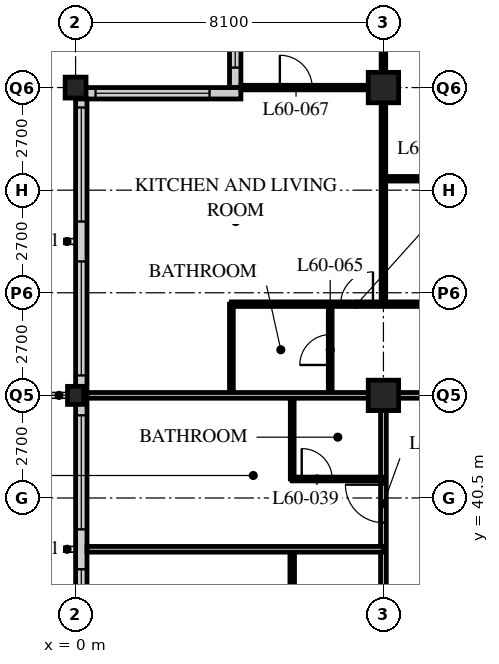
"""IFC4 building model, lengths in metres.
Left out: names, types, materials, properties, quantities, classifications, styles, units other than length and angle.
Written with IfcOpenShell. Run it as: python <this file> out.ifc"""

import sys

from ifc_helpers import new_model, si_unit, direction, frame, frame_2d, origin, origin_2d, place, context, subcontext, project, spatial, rectangle, hollow_rectangle, i_section, extrude, element, fill, save


model = new_model("IFC4")
c1 = context("Model", 3, precision=1e-05, world=origin(), true_north=direction((0.0, 1.0)))
c2 = subcontext(c1, "Body", "Model", "MODEL_VIEW")
j1 = project(units=[si_unit("LENGTHUNIT", "METRE"), si_unit("PLANEANGLEUNIT", "RADIAN")], contexts=[c1])
p1 = place(None, origin())
s1 = spatial("IfcSite", under=j1, at=p1, CompositionType="ELEMENT")
p2 = place(p1, origin())
s2 = spatial("IfcBuilding", under=s1, at=p2, CompositionType="ELEMENT")
p3 = place(p2, frame((0.0, 0.0, 231.6)))
s3 = spatial("IfcBuildingStorey", under=s2, at=p3, CompositionType="ELEMENT", Elevation=231.6)
p4 = place(p3, frame((0.0, 43.2, 0.0), z_axis=(0.0, 0.0, 1.0), x_axis=(1.0, 0.0, 0.0)))
e1 = element("IfcColumn", 1, at=p4, inside=s3, PredefinedType="COLUMN", context=c2, shape_type="SweptSolid", body=[
    extrude(i_section(OverallWidth=0.424, OverallDepth=0.475, WebThickness=0.048, FlangeThickness=0.077, FilletRadius=0.015, at=origin_2d()), origin(), (0.0, 0.0, 1.0), 3.6),
])
p5 = place(p3, frame((0.0, 51.3, 0.0), z_axis=(0.0, 0.0, 1.0), x_axis=(1.0, 0.0, 0.0)))
e2 = element("IfcColumn", 2, at=p5, inside=s3, PredefinedType="COLUMN", context=c2, shape_type="SweptSolid", body=[
    extrude(hollow_rectangle(XDim=0.55, YDim=0.55, WallThickness=0.045, at=origin_2d()), origin(), (0.0, 0.0, 1.0), 3.6),
])
for number, where, z_axis, x_axis in (
    (3, (8.1, 43.2, 0.0), (0.0, 0.0, 1.0), (1.0, 0.0, 0.0)),
    (4, (8.1, 51.3, 0.0), (0.0, 0.0, 1.0), (1.0, 0.0, 0.0)),
):
    element("IfcColumn", number, at=place(p3, frame(where, z_axis=z_axis, x_axis=x_axis)), inside=s3, PredefinedType="COLUMN", context=c2, shape_type="SweptSolid", body=[
        extrude(hollow_rectangle(XDim=0.8, YDim=0.8, WallThickness=0.08, at=origin_2d()), origin(), (0.0, 0.0, 1.0), 3.6),
    ])
p6 = place(p3, frame((4.2, 55.05, 0.0), z_axis=(0.0, 0.0, 1.0), x_axis=(0.0, -1.0, 0.0)))
e5 = element("IfcWall", 5, at=p6, inside=s3, PredefinedType="SOLIDWALL", context=c2, shape_type="SweptSolid", body=[
    extrude(rectangle(XDim=3.75, YDim=0.3, at=frame_2d((1.875, 0.0))), origin(), (0.0, 0.0, 1.0), 2.65),
])
p7 = place(p6, frame((0.225, 0.0, 0.6)))
e6 = element("IfcOpeningElement", 6, at=p7, cuts=e5, PredefinedType="OPENING", context=c2, shape_type="SweptSolid", body=[
    extrude(rectangle(XDim=3.0, YDim=1.7, at=frame_2d((1.5, 0.85))), frame((0.0, 0.16, 0.0), z_axis=(0.0, -1.0, 0.0), x_axis=(1.0, 0.0, 0.0)), (0.0, 0.0, 1.0), 0.32),
])
p8 = place(p3, frame((4.35, 51.15, 0.0), z_axis=(0.0, 0.0, 1.0), x_axis=(-1.0, 0.0, 0.0)))
e7 = element("IfcWall", 7, at=p8, inside=s3, PredefinedType="SOLIDWALL", context=c2, shape_type="SweptSolid", body=[
    extrude(rectangle(XDim=4.35, YDim=0.3, at=frame_2d((2.175, 0.0))), origin(), (0.0, 0.0, 1.0), 3.35),
])
p9 = place(p8, frame((0.825, 0.0, 0.6)))
e8 = element("IfcOpeningElement", 8, at=p9, cuts=e7, PredefinedType="OPENING", context=c2, shape_type="SweptSolid", body=[
    extrude(rectangle(XDim=3.0, YDim=1.7, at=frame_2d((1.5, 0.85))), frame((0.0, 0.16, 0.0), z_axis=(0.0, -1.0, 0.0), x_axis=(1.0, 0.0, 0.0)), (0.0, 0.0, 1.0), 0.32),
])
p10 = place(p3, frame((0.15, 51.0, 0.0), z_axis=(0.0, 0.0, 1.0), x_axis=(0.0, -1.0, 0.0)))
e9 = element("IfcWall", 9, at=p10, inside=s3, PredefinedType="SOLIDWALL", context=c2, shape_type="SweptSolid", body=[
    extrude(rectangle(XDim=32.1, YDim=0.3, at=frame_2d((16.05, 0.0))), origin(), (0.0, 0.0, 1.0), 2.35),
])
p11 = place(p10, frame((0.225, 0.0, 0.6)))
e10 = element("IfcOpeningElement", 10, at=p11, cuts=e9, PredefinedType="OPENING", context=c2, shape_type="SweptSolid", body=[
    extrude(rectangle(XDim=3.0, YDim=1.7, at=frame_2d((1.5, 0.85))), frame((0.0, 0.16, 0.0), z_axis=(0.0, -1.0, 0.0), x_axis=(1.0, 0.0, 0.0)), (0.0, 0.0, 1.0), 0.32),
])
p12 = place(p10, frame((4.275, 0.0, 0.6)))
e11 = element("IfcOpeningElement", 11, at=p12, cuts=e9, PredefinedType="OPENING", context=c2, shape_type="SweptSolid", body=[
    extrude(rectangle(XDim=3.0, YDim=1.7, at=frame_2d((1.5, 0.85))), frame((0.0, 0.16, 0.0), z_axis=(0.0, -1.0, 0.0), x_axis=(1.0, 0.0, 0.0)), (0.0, 0.0, 1.0), 0.32),
])
p13 = place(p10, frame((8.325, 0.0, 0.6)))
e12 = element("IfcOpeningElement", 12, at=p13, cuts=e9, PredefinedType="OPENING", context=c2, shape_type="SweptSolid", body=[
    extrude(rectangle(XDim=3.0, YDim=1.7, at=frame_2d((1.5, 0.85))), frame((0.0, 0.16, 0.0), z_axis=(0.0, -1.0, 0.0), x_axis=(1.0, 0.0, 0.0)), (0.0, 0.0, 1.0), 0.32),
])
p14 = place(p10, frame((12.375, 0.0, 0.6)))
e13 = element("IfcOpeningElement", 13, at=p14, cuts=e9, PredefinedType="OPENING", context=c2, shape_type="SweptSolid", body=[
    extrude(rectangle(XDim=3.0, YDim=1.7, at=frame_2d((1.5, 0.85))), frame((0.0, 0.16, 0.0), z_axis=(0.0, -1.0, 0.0), x_axis=(1.0, 0.0, 0.0)), (0.0, 0.0, 1.0), 0.32),
])
p15 = place(p10, frame((16.425, 0.0, 0.6)))
e14 = element("IfcOpeningElement", 14, at=p15, cuts=e9, PredefinedType="OPENING", context=c2, shape_type="SweptSolid", body=[
    extrude(rectangle(XDim=3.0, YDim=1.7, at=frame_2d((1.5, 0.85))), frame((0.0, 0.16, 0.0), z_axis=(0.0, -1.0, 0.0), x_axis=(1.0, 0.0, 0.0)), (0.0, 0.0, 1.0), 0.32),
])
p16 = place(p10, frame((20.475, 0.0, 0.6)))
e15 = element("IfcOpeningElement", 15, at=p16, cuts=e9, PredefinedType="OPENING", context=c2, shape_type="SweptSolid", body=[
    extrude(rectangle(XDim=3.0, YDim=1.7, at=frame_2d((1.5, 0.85))), frame((0.0, 0.16, 0.0), z_axis=(0.0, -1.0, 0.0), x_axis=(1.0, 0.0, 0.0)), (0.0, 0.0, 1.0), 0.32),
])
p17 = place(p10, frame((24.525, 0.0, 0.6)))
e16 = element("IfcOpeningElement", 16, at=p17, cuts=e9, PredefinedType="OPENING", context=c2, shape_type="SweptSolid", body=[
    extrude(rectangle(XDim=3.0, YDim=1.7, at=frame_2d((1.5, 0.85))), frame((0.0, 0.16, 0.0), z_axis=(0.0, -1.0, 0.0), x_axis=(1.0, 0.0, 0.0)), (0.0, 0.0, 1.0), 0.32),
])
p18 = place(p10, frame((28.575, 0.0, 0.6)))
e17 = element("IfcOpeningElement", 17, at=p18, cuts=e9, PredefinedType="OPENING", context=c2, shape_type="SweptSolid", body=[
    extrude(rectangle(XDim=3.0, YDim=1.7, at=frame_2d((1.5, 0.85))), frame((0.0, 0.16, 0.0), z_axis=(0.0, -1.0, 0.0), x_axis=(1.0, 0.0, 0.0)), (0.0, 0.0, 1.0), 0.32),
])
p19 = place(p3, frame((8.1, 43.2, 0.0), z_axis=(0.0, 0.0, 1.0), x_axis=(1.0, 0.0, 0.0)))
e18 = element("IfcWall", 18, at=p19, inside=s3, PredefinedType="PARTITIONING", context=c2, shape_type="SweptSolid", body=[
    extrude(rectangle(XDim=36.45, YDim=0.15, at=frame_2d((18.225, 0.0))), origin(), (0.0, 0.0, 1.0), 2.35),
])
p20 = place(p19, frame((4.45, 0.0, 0.0)))
e19 = element("IfcOpeningElement", 19, at=p20, cuts=e18, PredefinedType="OPENING", context=c2, shape_type="SweptSolid", body=[
    extrude(rectangle(XDim=1.0, YDim=2.1, at=frame_2d((0.5, 1.05))), frame((0.0, 0.085, 0.0), z_axis=(0.0, -1.0, 0.0), x_axis=(1.0, 0.0, 0.0)), (0.0, 0.0, 1.0), 0.17),
])
p21 = place(p19, frame((17.1, 0.0, 0.0)))
e20 = element("IfcOpeningElement", 20, at=p21, cuts=e18, PredefinedType="OPENING", context=c2, shape_type="SweptSolid", body=[
    extrude(rectangle(XDim=1.0, YDim=2.1, at=frame_2d((0.5, 1.05))), frame((0.0, 0.085, 0.0), z_axis=(0.0, -1.0, 0.0), x_axis=(1.0, 0.0, 0.0)), (0.0, 0.0, 1.0), 0.17),
])
p22 = place(p19, frame((29.05, 0.0, 0.0)))
e21 = element("IfcOpeningElement", 21, at=p22, cuts=e18, PredefinedType="OPENING", context=c2, shape_type="SweptSolid", body=[
    extrude(rectangle(XDim=1.0, YDim=2.1, at=frame_2d((0.5, 1.05))), frame((0.0, 0.085, 0.0), z_axis=(0.0, -1.0, 0.0), x_axis=(1.0, 0.0, 0.0)), (0.0, 0.0, 1.0), 0.17),
])
p23 = place(p19, frame((33.925, 0.0, 0.0)))
e22 = element("IfcOpeningElement", 22, at=p23, cuts=e18, PredefinedType="OPENING", context=c2, shape_type="SweptSolid", body=[
    extrude(rectangle(XDim=1.0, YDim=2.1, at=frame_2d((0.5, 1.05))), frame((0.0, 0.085, 0.0), z_axis=(0.0, -1.0, 0.0), x_axis=(1.0, 0.0, 0.0)), (0.0, 0.0, 1.0), 0.17),
])
p24 = place(p19, frame((1.525, 0.0, 0.0)))
e23 = element("IfcOpeningElement", 23, at=p24, cuts=e18, PredefinedType="OPENING", context=c2, shape_type="SweptSolid", body=[
    extrude(rectangle(XDim=1.0, YDim=2.1, at=frame_2d((0.5, 1.05))), frame((0.0, 0.085, 0.0), z_axis=(0.0, -1.0, 0.0), x_axis=(1.0, 0.0, 0.0)), (0.0, 0.0, 1.0), 0.17),
])
p25 = place(p3, frame((8.1, 18.9, 0.0), z_axis=(0.0, 0.0, 1.0), x_axis=(0.0, 1.0, 0.0)))
e24 = element("IfcWall", 24, at=p25, inside=s3, PredefinedType="PARTITIONING", context=c2, shape_type="SweptSolid", body=[
    extrude(rectangle(XDim=24.3, YDim=0.15, at=frame_2d((12.15, 0.0))), origin(), (0.0, 0.0, 1.0), 2.35),
])
p26 = place(p25, frame((0.9, 0.0, 0.0)))
e25 = element("IfcOpeningElement", 25, at=p26, cuts=e24, PredefinedType="OPENING", context=c2, shape_type="SweptSolid", body=[
    extrude(rectangle(XDim=1.0, YDim=2.1, at=frame_2d((0.5, 1.05))), frame((0.0, 0.085, 0.0), z_axis=(0.0, -1.0, 0.0), x_axis=(1.0, 0.0, 0.0)), (0.0, 0.0, 1.0), 0.17),
])
p27 = place(p25, frame((20.95, 0.0, 0.0)))
e26 = element("IfcOpeningElement", 26, at=p27, cuts=e24, PredefinedType="OPENING", context=c2, shape_type="SweptSolid", body=[
    extrude(rectangle(XDim=1.0, YDim=2.1, at=frame_2d((0.5, 1.05))), frame((0.0, 0.085, 0.0), z_axis=(0.0, -1.0, 0.0), x_axis=(1.0, 0.0, 0.0)), (0.0, 0.0, 1.0), 0.17),
])
p28 = place(p3, frame((5.7, 18.9, 0.0), z_axis=(0.0, 0.0, 1.0), x_axis=(0.0, 1.0, 0.0)))
e27 = element("IfcWall", 27, at=p28, inside=s3, PredefinedType="PARTITIONING", context=c2, shape_type="SweptSolid", body=[
    extrude(rectangle(XDim=20.25, YDim=0.12, at=frame_2d((10.125, 0.0))), origin(), (0.0, 0.0, 1.0), 3.35),
])
p29 = place(p28, frame((0.975, 0.0, 0.0)))
e28 = element("IfcOpeningElement", 28, at=p29, cuts=e27, PredefinedType="OPENING", context=c2, shape_type="SweptSolid", body=[
    extrude(rectangle(XDim=0.85, YDim=2.1, at=frame_2d((0.425, 1.05))), frame((0.0, 0.07, 0.0), z_axis=(0.0, -1.0, 0.0), x_axis=(1.0, 0.0, 0.0)), (0.0, 0.0, 1.0), 0.14),
])
p30 = place(p28, frame((8.425, 0.0, 0.0)))
e29 = element("IfcOpeningElement", 29, at=p30, cuts=e27, PredefinedType="OPENING", context=c2, shape_type="SweptSolid", body=[
    extrude(rectangle(XDim=0.85, YDim=2.1, at=frame_2d((0.425, 1.05))), frame((0.0, 0.07, 0.0), z_axis=(0.0, -1.0, 0.0), x_axis=(1.0, 0.0, 0.0)), (0.0, 0.0, 1.0), 0.14),
])
p31 = place(p28, frame((12.475, 0.0, 0.0)))
e30 = element("IfcOpeningElement", 30, at=p31, cuts=e27, PredefinedType="OPENING", context=c2, shape_type="SweptSolid", body=[
    extrude(rectangle(XDim=0.85, YDim=2.1, at=frame_2d((0.425, 1.05))), frame((0.0, 0.07, 0.0), z_axis=(0.0, -1.0, 0.0), x_axis=(1.0, 0.0, 0.0)), (0.0, 0.0, 1.0), 0.14),
])
p32 = place(p28, frame((16.525, 0.0, 0.0)))
e31 = element("IfcOpeningElement", 31, at=p32, cuts=e27, PredefinedType="OPENING", context=c2, shape_type="SweptSolid", body=[
    extrude(rectangle(XDim=0.85, YDim=2.1, at=frame_2d((0.425, 1.05))), frame((0.0, 0.07, 0.0), z_axis=(0.0, -1.0, 0.0), x_axis=(1.0, 0.0, 0.0)), (0.0, 0.0, 1.0), 0.14),
])
p33 = place(p3, frame((8.1, 39.15, 0.0), z_axis=(0.0, 0.0, 1.0), x_axis=(-1.0, 0.0, 0.0)))
e32 = element("IfcWall", 32, at=p33, inside=s3, PredefinedType="PARTITIONING", context=c2, shape_type="SweptSolid", body=[
    extrude(rectangle(XDim=7.8, YDim=0.15, at=frame_2d((3.9, 0.0))), origin(), (0.0, 0.0, 1.0), 3.35),
])
p34 = place(p3, frame((5.7, 41.0, 0.0), z_axis=(0.0, 0.0, 1.0), x_axis=(0.0, 1.0, 0.0)))
e33 = element("IfcWall", 33, at=p34, inside=s3, PredefinedType="PARTITIONING", context=c2, shape_type="SweptSolid", body=[
    extrude(rectangle(XDim=2.2, YDim=0.1, at=frame_2d((1.1, 0.0))), origin(), (0.0, 0.0, 1.0), 3.35),
])
p35 = place(p3, frame((8.1, 41.0, 0.0), z_axis=(0.0, 0.0, 1.0), x_axis=(-1.0, 0.0, 0.0)))
e34 = element("IfcWall", 34, at=p35, inside=s3, PredefinedType="PARTITIONING", context=c2, shape_type="SweptSolid", body=[
    extrude(rectangle(XDim=2.4, YDim=0.1, at=frame_2d((1.2, 0.0))), origin(), (0.0, 0.0, 1.0), 3.35),
])
p36 = place(p35, frame((1.35, 0.0, 0.0)))
e35 = element("IfcOpeningElement", 35, at=p36, cuts=e34, PredefinedType="OPENING", context=c2, shape_type="SweptSolid", body=[
    extrude(rectangle(XDim=0.8, YDim=2.1, at=frame_2d((0.4, 1.05))), frame((0.0, 0.06, 0.0), z_axis=(0.0, -1.0, 0.0), x_axis=(1.0, 0.0, 0.0)), (0.0, 0.0, 1.0), 0.12),
])
p37 = place(p3, frame((6.7, 43.2, 0.0), z_axis=(0.0, 0.0, 1.0), x_axis=(0.0, 1.0, 0.0)))
e36 = element("IfcWall", 36, at=p37, inside=s3, PredefinedType="PARTITIONING", context=c2, shape_type="SweptSolid", body=[
    extrude(rectangle(XDim=2.4, YDim=0.1, at=frame_2d((1.2, 0.0))), origin(), (0.0, 0.0, 1.0), 3.35),
])
p38 = place(p37, frame((0.8, 0.0, 0.0)))
e37 = element("IfcOpeningElement", 37, at=p38, cuts=e36, PredefinedType="OPENING", context=c2, shape_type="SweptSolid", body=[
    extrude(rectangle(XDim=0.8, YDim=2.1, at=frame_2d((0.4, 1.05))), frame((0.0, 0.06, 0.0), z_axis=(0.0, -1.0, 0.0), x_axis=(1.0, 0.0, 0.0)), (0.0, 0.0, 1.0), 0.12),
])
p39 = place(p3, frame((4.1, 43.2, 0.0), z_axis=(0.0, 0.0, 1.0), x_axis=(0.0, 1.0, 0.0)))
e38 = element("IfcWall", 38, at=p39, inside=s3, PredefinedType="PARTITIONING", context=c2, shape_type="SweptSolid", body=[
    extrude(rectangle(XDim=2.4, YDim=0.1, at=frame_2d((1.2, 0.0))), origin(), (0.0, 0.0, 1.0), 3.35),
])
p40 = place(p3, frame((4.1, 45.6, 0.0), z_axis=(0.0, 0.0, 1.0), x_axis=(1.0, 0.0, 0.0)))
e39 = element("IfcWall", 39, at=p40, inside=s3, PredefinedType="PARTITIONING", context=c2, shape_type="SweptSolid", body=[
    extrude(rectangle(XDim=32.35, YDim=0.12, at=frame_2d((16.175, 0.0))), origin(), (0.0, 0.0, 1.0), 3.35),
])
p41 = place(p40, frame((9.025, 0.0, 0.0)))
e40 = element("IfcOpeningElement", 40, at=p41, cuts=e39, PredefinedType="OPENING", context=c2, shape_type="SweptSolid", body=[
    extrude(rectangle(XDim=0.85, YDim=2.1, at=frame_2d((0.425, 1.05))), frame((0.0, 0.07, 0.0), z_axis=(0.0, -1.0, 0.0), x_axis=(1.0, 0.0, 0.0)), (0.0, 0.0, 1.0), 0.14),
])
p42 = place(p40, frame((16.475, 0.0, 0.0)))
e41 = element("IfcOpeningElement", 41, at=p42, cuts=e39, PredefinedType="OPENING", context=c2, shape_type="SweptSolid", body=[
    extrude(rectangle(XDim=0.85, YDim=2.1, at=frame_2d((0.425, 1.05))), frame((0.0, 0.07, 0.0), z_axis=(0.0, -1.0, 0.0), x_axis=(1.0, 0.0, 0.0)), (0.0, 0.0, 1.0), 0.14),
])
p43 = place(p40, frame((21.175, 0.0, 0.0)))
e42 = element("IfcOpeningElement", 42, at=p43, cuts=e39, PredefinedType="OPENING", context=c2, shape_type="SweptSolid", body=[
    extrude(rectangle(XDim=0.85, YDim=2.1, at=frame_2d((0.425, 1.05))), frame((0.0, 0.07, 0.0), z_axis=(0.0, -1.0, 0.0), x_axis=(1.0, 0.0, 0.0)), (0.0, 0.0, 1.0), 0.14),
])
p44 = place(p40, frame((28.625, 0.0, 0.0)))
e43 = element("IfcOpeningElement", 43, at=p44, cuts=e39, PredefinedType="OPENING", context=c2, shape_type="SweptSolid", body=[
    extrude(rectangle(XDim=0.85, YDim=2.1, at=frame_2d((0.425, 1.05))), frame((0.0, 0.07, 0.0), z_axis=(0.0, -1.0, 0.0), x_axis=(1.0, 0.0, 0.0)), (0.0, 0.0, 1.0), 0.14),
])
p45 = place(p40, frame((6.725, 0.0, 0.0)))
e44 = element("IfcOpeningElement", 44, at=p45, cuts=e39, PredefinedType="OPENING", context=c2, shape_type="SweptSolid", body=[
    extrude(rectangle(XDim=0.85, YDim=2.1, at=frame_2d((0.425, 1.05))), frame((0.0, 0.07, 0.0), z_axis=(0.0, -1.0, 0.0), x_axis=(1.0, 0.0, 0.0)), (0.0, 0.0, 1.0), 0.14),
])
p46 = place(p40, frame((2.875, 0.0, 0.0)))
e45 = element("IfcOpeningElement", 45, at=p46, cuts=e39, PredefinedType="OPENING", context=c2, shape_type="SweptSolid", body=[
    extrude(rectangle(XDim=0.85, YDim=2.1, at=frame_2d((0.425, 1.05))), frame((0.0, 0.07, 0.0), z_axis=(0.0, -1.0, 0.0), x_axis=(1.0, 0.0, 0.0)), (0.0, 0.0, 1.0), 0.14),
])
p47 = place(p3, frame((8.1, 45.6, 0.0), z_axis=(0.0, 0.0, 1.0), x_axis=(0.0, 1.0, 0.0)))
e46 = element("IfcWall", 46, at=p47, inside=s3, PredefinedType="PARTITIONING", context=c2, shape_type="SweptSolid", body=[
    extrude(rectangle(XDim=9.45, YDim=0.12, at=frame_2d((4.725, 0.0))), origin(), (0.0, 0.0, 1.0), 2.35),
])
p48 = place(p3, frame((8.1, 51.3, 0.0), z_axis=(0.0, 0.0, 1.0), x_axis=(-1.0, 0.0, 0.0)))
e47 = element("IfcWall", 47, at=p48, inside=s3, PredefinedType="PARTITIONING", context=c2, shape_type="SweptSolid", body=[
    extrude(rectangle(XDim=3.75, YDim=0.12, at=frame_2d((1.875, 0.0))), origin(), (0.0, 0.0, 1.0), 2.588),
])
p49 = place(p48, frame((1.875, 0.0, 0.0)))
e48 = element("IfcOpeningElement", 48, at=p49, cuts=e47, PredefinedType="OPENING", context=c2, shape_type="SweptSolid", body=[
    extrude(rectangle(XDim=0.85, YDim=2.1, at=frame_2d((0.425, 1.05))), frame((0.0, 0.07, 0.0), z_axis=(0.0, -1.0, 0.0), x_axis=(1.0, 0.0, 0.0)), (0.0, 0.0, 1.0), 0.14),
])
p50 = place(p3, frame((0.3, 43.2, 0.0), z_axis=(0.0, 0.0, 1.0), x_axis=(1.0, 0.0, 0.0)))
e49 = element("IfcWall", 49, at=p50, inside=s3, PredefinedType="PARTITIONING", context=c2, shape_type="SweptSolid", body=[
    extrude(rectangle(XDim=7.8, YDim=0.15, at=frame_2d((3.9, 0.0))), origin(), (0.0, 0.0, 1.0), 2.35),
])
p51 = place(p3, frame((8.1, 48.9, 0.0), z_axis=(0.0, 0.0, 1.0), x_axis=(1.0, 0.0, 0.0)))
e50 = element("IfcWall", 50, at=p51, inside=s3, PredefinedType="PARTITIONING", context=c2, shape_type="SweptSolid", body=[
    extrude(rectangle(XDim=4.05, YDim=0.12, at=frame_2d((2.025, 0.0))), origin(), (0.0, 0.0, 1.0), 3.35),
])
p52 = place(p51, frame((1.6, 0.0, 0.0)))
e51 = element("IfcOpeningElement", 51, at=p52, cuts=e50, PredefinedType="OPENING", context=c2, shape_type="SweptSolid", body=[
    extrude(rectangle(XDim=0.85, YDim=2.1, at=frame_2d((0.425, 1.05))), frame((0.0, 0.07, 0.0), z_axis=(0.0, -1.0, 0.0), x_axis=(1.0, 0.0, 0.0)), (0.0, 0.0, 1.0), 0.14),
])
p53 = place(p7, origin())
e52 = element("IfcWindow", 52, at=p53, inside=s3, PartitioningType="SINGLE_PANEL", PredefinedType="WINDOW", context=c2, shape_type="SweptSolid", body=[
    extrude(rectangle(XDim=3.0, YDim=1.7, at=frame_2d((1.5, 0.85))), frame((0.0, 0.03, 0.0), z_axis=(0.0, -1.0, 0.0), x_axis=(1.0, 0.0, 0.0)), (0.0, 0.0, 1.0), 0.06),
])
fill(e6, e52)
p54 = place(p9, origin())
e53 = element("IfcWindow", 53, at=p54, inside=s3, PartitioningType="SINGLE_PANEL", PredefinedType="WINDOW", context=c2, shape_type="SweptSolid", body=[
    extrude(rectangle(XDim=3.0, YDim=1.7, at=frame_2d((1.5, 0.85))), frame((0.0, 0.03, 0.0), z_axis=(0.0, -1.0, 0.0), x_axis=(1.0, 0.0, 0.0)), (0.0, 0.0, 1.0), 0.06),
])
fill(e8, e53)
p55 = place(p11, origin())
e54 = element("IfcWindow", 54, at=p55, inside=s3, PartitioningType="SINGLE_PANEL", PredefinedType="WINDOW", context=c2, shape_type="SweptSolid", body=[
    extrude(rectangle(XDim=3.0, YDim=1.7, at=frame_2d((1.5, 0.85))), frame((0.0, 0.03, 0.0), z_axis=(0.0, -1.0, 0.0), x_axis=(1.0, 0.0, 0.0)), (0.0, 0.0, 1.0), 0.06),
])
fill(e10, e54)
p56 = place(p12, origin())
e55 = element("IfcWindow", 55, at=p56, inside=s3, PartitioningType="SINGLE_PANEL", PredefinedType="WINDOW", context=c2, shape_type="SweptSolid", body=[
    extrude(rectangle(XDim=3.0, YDim=1.7, at=frame_2d((1.5, 0.85))), frame((0.0, 0.03, 0.0), z_axis=(0.0, -1.0, 0.0), x_axis=(1.0, 0.0, 0.0)), (0.0, 0.0, 1.0), 0.06),
])
fill(e11, e55)
p57 = place(p13, origin())
e56 = element("IfcWindow", 56, at=p57, inside=s3, PartitioningType="SINGLE_PANEL", PredefinedType="WINDOW", context=c2, shape_type="SweptSolid", body=[
    extrude(rectangle(XDim=3.0, YDim=1.7, at=frame_2d((1.5, 0.85))), frame((0.0, 0.03, 0.0), z_axis=(0.0, -1.0, 0.0), x_axis=(1.0, 0.0, 0.0)), (0.0, 0.0, 1.0), 0.06),
])
fill(e12, e56)
p58 = place(p14, origin())
e57 = element("IfcWindow", 57, at=p58, inside=s3, PartitioningType="SINGLE_PANEL", PredefinedType="WINDOW", context=c2, shape_type="SweptSolid", body=[
    extrude(rectangle(XDim=3.0, YDim=1.7, at=frame_2d((1.5, 0.85))), frame((0.0, 0.03, 0.0), z_axis=(0.0, -1.0, 0.0), x_axis=(1.0, 0.0, 0.0)), (0.0, 0.0, 1.0), 0.06),
])
fill(e13, e57)
p59 = place(p36, origin())
e58 = element("IfcDoor", 58, at=p59, inside=s3, OperationType="SINGLE_SWING_LEFT", PredefinedType="DOOR", context=c2, shape_type="SweptSolid", body=[
    extrude(rectangle(XDim=0.8, YDim=2.1, at=frame_2d((0.4, 1.05))), frame((0.0, 0.025, 0.0), z_axis=(0.0, -1.0, 0.0), x_axis=(1.0, 0.0, 0.0)), (0.0, 0.0, 1.0), 0.05),
])
fill(e35, e58)
p60 = place(p27, origin())
e59 = element("IfcDoor", 59, at=p60, inside=s3, OperationType="SINGLE_SWING_RIGHT", PredefinedType="DOOR", context=c2, shape_type="SweptSolid", body=[
    extrude(rectangle(XDim=1.0, YDim=2.1, at=frame_2d((0.5, 1.05))), frame((0.0, 0.025, 0.0), z_axis=(0.0, -1.0, 0.0), x_axis=(1.0, 0.0, 0.0)), (0.0, 0.0, 1.0), 0.05),
])
fill(e26, e59)
p61 = place(p38, origin())
e60 = element("IfcDoor", 60, at=p61, inside=s3, OperationType="SINGLE_SWING_LEFT", PredefinedType="DOOR", context=c2, shape_type="SweptSolid", body=[
    extrude(rectangle(XDim=0.8, YDim=2.1, at=frame_2d((0.4, 1.05))), frame((0.0, 0.025, 0.0), z_axis=(0.0, -1.0, 0.0), x_axis=(1.0, 0.0, 0.0)), (0.0, 0.0, 1.0), 0.05),
])
fill(e37, e60)
p62 = place(p46, origin())
e61 = element("IfcDoor", 61, at=p62, inside=s3, OperationType="SINGLE_SWING_RIGHT", PredefinedType="DOOR", context=c2, shape_type="SweptSolid", body=[
    extrude(rectangle(XDim=0.85, YDim=2.1, at=frame_2d((0.425, 1.05))), frame((0.0, 0.025, 0.0), z_axis=(0.0, -1.0, 0.0), x_axis=(1.0, 0.0, 0.0)), (0.0, 0.0, 1.0), 0.05),
])
fill(e45, e61)
p63 = place(p49, origin())
e62 = element("IfcDoor", 62, at=p63, inside=s3, OperationType="SINGLE_SWING_LEFT", PredefinedType="DOOR", context=c2, shape_type="SweptSolid", body=[
    extrude(rectangle(XDim=0.85, YDim=2.1, at=frame_2d((0.425, 1.05))), frame((0.0, 0.025, 0.0), z_axis=(0.0, -1.0, 0.0), x_axis=(1.0, 0.0, 0.0)), (0.0, 0.0, 1.0), 0.05),
])
fill(e48, e62)
save(model, sys.argv[1])
